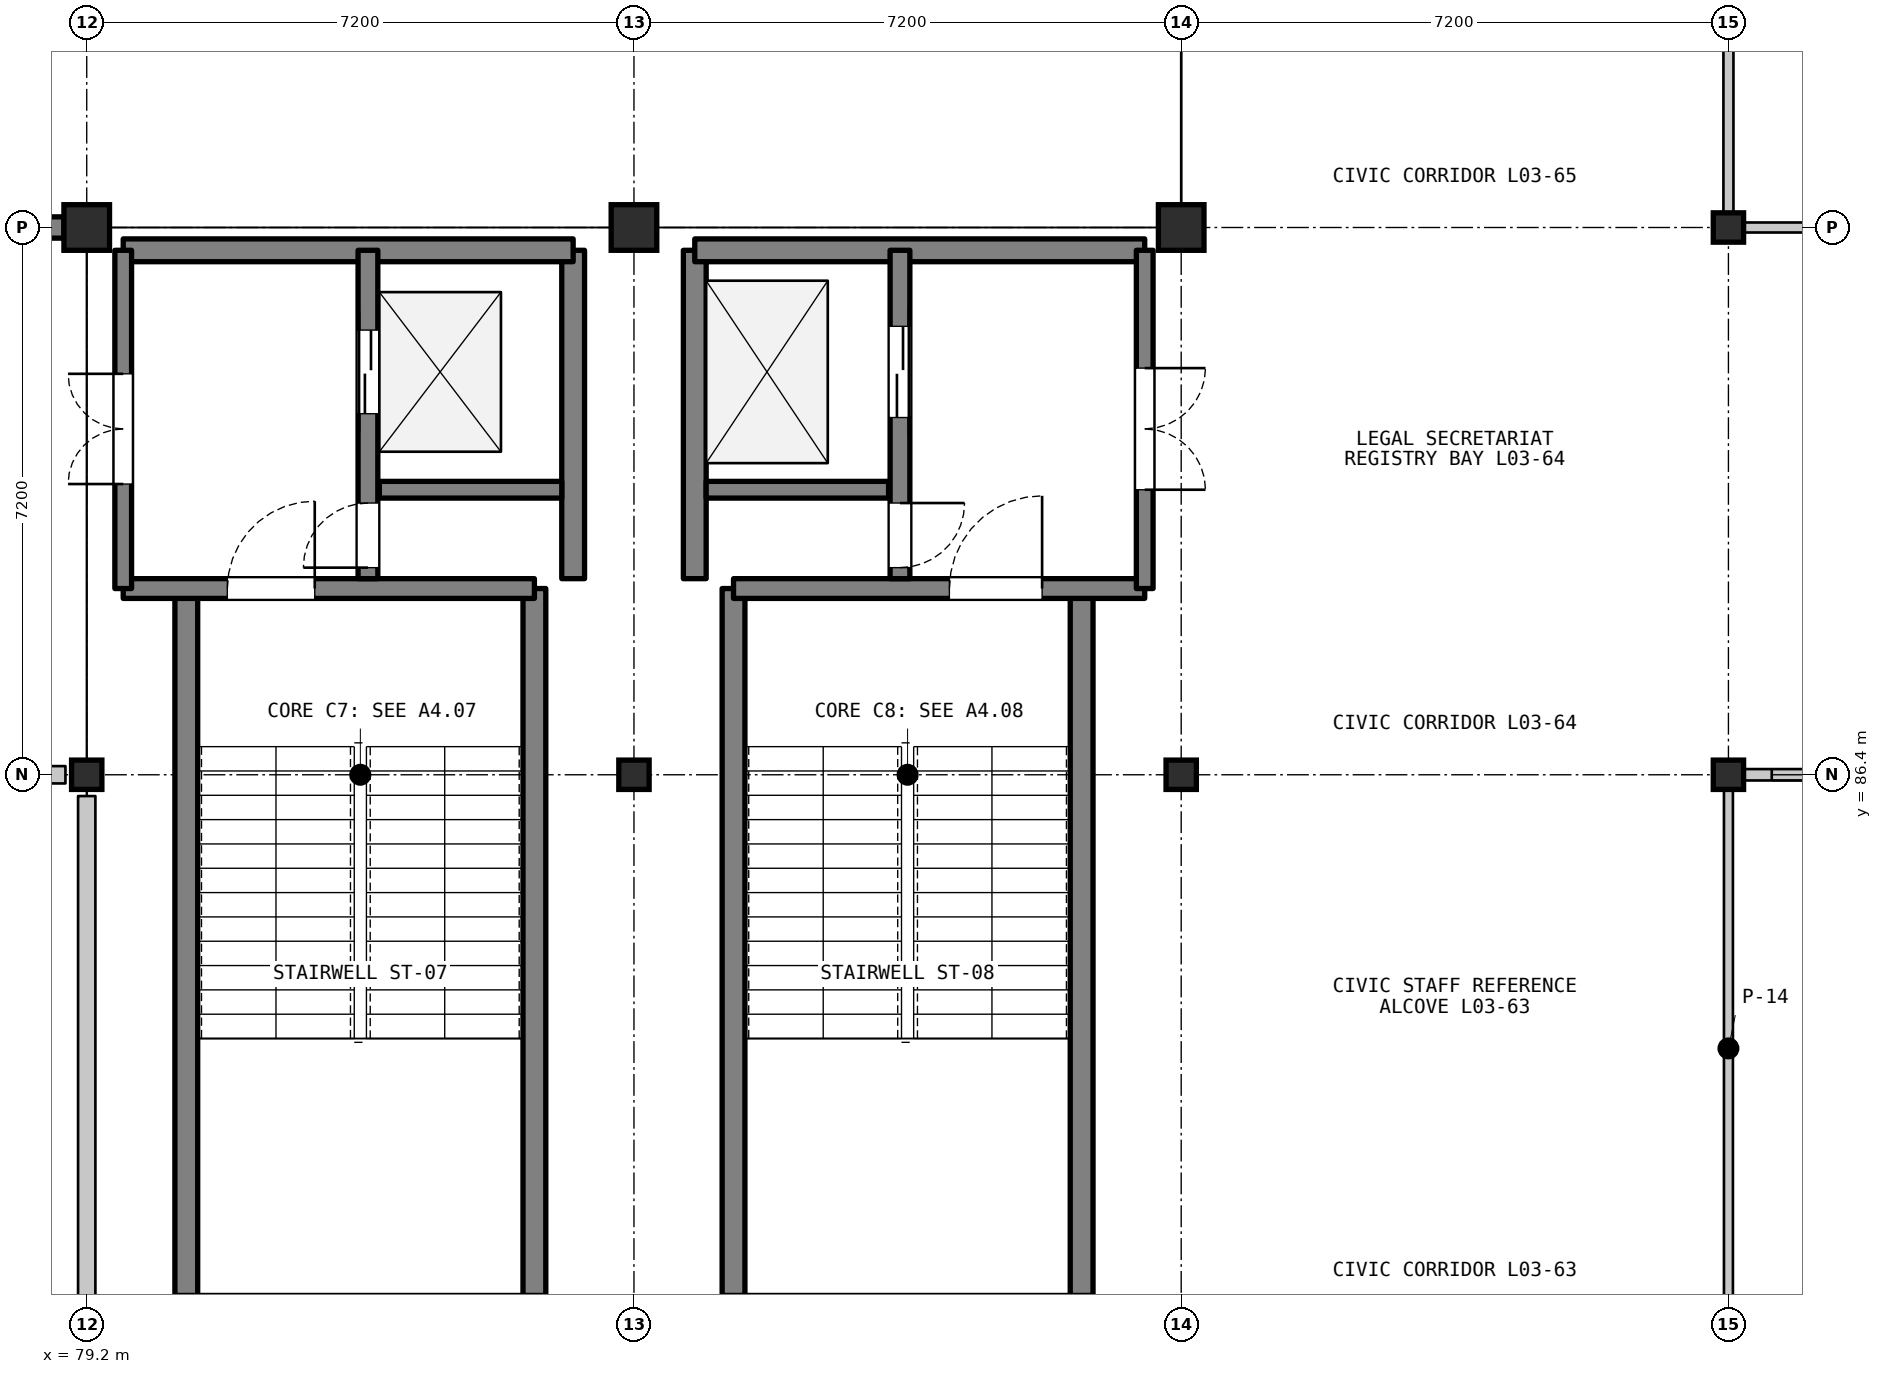
"""IFC4 building model, lengths in metres.
Left out: names, types, materials, properties, quantities, classifications, styles, units other than length and angle.
Written with IfcOpenShell. Run it as: python <this file> out.ifc"""

import sys

from ifc_helpers import new_model, si_unit, direction, frame, frame_2d, origin, origin_2d, place, context, subcontext, project, spatial, rectangle, i_section, extrude, element, fill, save


model = new_model("IFC4")
c1 = context("Model", 3, precision=1e-05, world=origin(), true_north=direction((0.0, 1.0)))
c2 = subcontext(c1, "Body", "Model", "MODEL_VIEW")
j1 = project(units=[si_unit("LENGTHUNIT", "METRE"), si_unit("PLANEANGLEUNIT", "RADIAN")], contexts=[c1])
p1 = place(None, origin())
s1 = spatial("IfcSite", under=j1, at=p1, CompositionType="ELEMENT")
p2 = place(p1, origin())
s2 = spatial("IfcBuilding", under=s1, at=p2, CompositionType="ELEMENT")
p3 = place(p2, frame((0.0, 0.0, 9.9)))
s3 = spatial("IfcBuildingStorey", under=s2, at=p3, CompositionType="ELEMENT", Elevation=9.9)
p4 = place(p3, frame((79.2, 86.4, 0.0), z_axis=(0.0, 0.0, 1.0), x_axis=(1.0, 0.0, 0.0)))
e1 = element("IfcColumn", 1, at=p4, inside=s3, PredefinedType="COLUMN", context=c2, shape_type="SweptSolid", body=[
    extrude(i_section(OverallWidth=0.399, OverallDepth=0.386, WebThickness=0.021, FlangeThickness=0.033, FilletRadius=0.015, at=origin_2d()), origin(), (0.0, 0.0, 1.0), 4.2),
])
p5 = place(p3, frame((79.2, 93.6, 0.0), z_axis=(0.0, 0.0, 1.0), x_axis=(1.0, 0.0, 0.0)))
e2 = element("IfcColumn", 2, at=p5, inside=s3, PredefinedType="COLUMN", context=c2, shape_type="SweptSolid", body=[
    extrude(rectangle(XDim=0.6, YDim=0.6, at=origin_2d()), origin(), (0.0, 0.0, 1.0), 4.2),
])
p6 = place(p3, frame((86.4, 86.4, 0.0), z_axis=(0.0, 0.0, 1.0), x_axis=(1.0, 0.0, 0.0)))
e3 = element("IfcColumn", 3, at=p6, inside=s3, PredefinedType="COLUMN", context=c2, shape_type="SweptSolid", body=[
    extrude(i_section(OverallWidth=0.399, OverallDepth=0.386, WebThickness=0.021, FlangeThickness=0.033, FilletRadius=0.015, at=origin_2d()), origin(), (0.0, 0.0, 1.0), 4.2),
])
p7 = place(p3, frame((86.4, 93.6, 0.0), z_axis=(0.0, 0.0, 1.0), x_axis=(1.0, 0.0, 0.0)))
e4 = element("IfcColumn", 4, at=p7, inside=s3, PredefinedType="COLUMN", context=c2, shape_type="SweptSolid", body=[
    extrude(rectangle(XDim=0.6, YDim=0.6, at=origin_2d()), origin(), (0.0, 0.0, 1.0), 4.2),
])
p8 = place(p3, frame((93.6, 86.4, 0.0), z_axis=(0.0, 0.0, 1.0), x_axis=(1.0, 0.0, 0.0)))
e5 = element("IfcColumn", 5, at=p8, inside=s3, PredefinedType="COLUMN", context=c2, shape_type="SweptSolid", body=[
    extrude(i_section(OverallWidth=0.399, OverallDepth=0.386, WebThickness=0.021, FlangeThickness=0.033, FilletRadius=0.015, at=origin_2d()), origin(), (0.0, 0.0, 1.0), 4.2),
])
p9 = place(p3, frame((93.6, 93.6, 0.0), z_axis=(0.0, 0.0, 1.0), x_axis=(1.0, 0.0, 0.0)))
e6 = element("IfcColumn", 6, at=p9, inside=s3, PredefinedType="COLUMN", context=c2, shape_type="SweptSolid", body=[
    extrude(rectangle(XDim=0.6, YDim=0.6, at=origin_2d()), origin(), (0.0, 0.0, 1.0), 4.2),
])
for number, where, z_axis, x_axis in (
    (7, (100.8, 86.4, 0.0), (0.0, 0.0, 1.0), (1.0, 0.0, 0.0)),
    (8, (100.8, 93.6, 0.0), (0.0, 0.0, 1.0), (1.0, 0.0, 0.0)),
):
    element("IfcColumn", number, at=place(p3, frame(where, z_axis=z_axis, x_axis=x_axis)), inside=s3, PredefinedType="COLUMN", context=c2, shape_type="SweptSolid", body=[
        extrude(i_section(OverallWidth=0.399, OverallDepth=0.386, WebThickness=0.021, FlangeThickness=0.033, FilletRadius=0.015, at=origin_2d()), origin(), (0.0, 0.0, 1.0), 4.2),
    ])
p10 = place(p3, frame((72.3, 93.6, 0.0), z_axis=(0.0, 0.0, 1.0), x_axis=(1.0, 0.0, 0.0)))
e9 = element("IfcWall", 9, at=p10, inside=s3, PredefinedType="SOLIDWALL", context=c2, shape_type="SweptSolid", body=[
    extrude(rectangle(XDim=6.6, YDim=0.28, at=frame_2d((3.3, 0.0))), origin(), (0.0, 0.0, 1.0), 3.418),
])
for number, where, z_axis, x_axis in (
    (10, (80.51, 79.55, 0.0), (0.0, 0.0, 1.0), (0.0, 1.0, 0.0)),
    (11, (85.09, 79.55, 0.0), (0.0, 0.0, 1.0), (0.0, 1.0, 0.0)),
):
    element("IfcWall", number, at=place(p3, frame(where, z_axis=z_axis, x_axis=x_axis)), inside=s3, PredefinedType="SHEAR", context=c2, shape_type="SweptSolid", body=[
        extrude(rectangle(XDim=9.3, YDim=0.3, at=frame_2d((4.65, 0.0))), origin(), (0.0, 0.0, 1.0), 4.02),
    ])
p11 = place(p3, frame((79.68, 88.85, 0.0), z_axis=(0.0, 0.0, 1.0), x_axis=(1.0, 0.0, 0.0)))
e12 = element("IfcWall", 12, at=p11, inside=s3, PredefinedType="SHEAR", context=c2, shape_type="SweptSolid", body=[
    extrude(rectangle(XDim=5.41, YDim=0.26, at=frame_2d((2.705, 0.0))), origin(), (0.0, 0.0, 1.0), 4.02),
])
p12 = place(p11, frame((1.37, 0.0, 0.0)))
e13 = element("IfcOpeningElement", 13, at=p12, cuts=e12, PredefinedType="OPENING", context=c2, shape_type="SweptSolid", body=[
    extrude(rectangle(XDim=1.15, YDim=2.15, at=frame_2d((0.575, 1.075))), frame((0.0, 0.14, 0.0), z_axis=(0.0, -1.0, 0.0), x_axis=(1.0, 0.0, 0.0)), (0.0, 0.0, 1.0), 0.28),
])
p13 = place(p3, frame((85.6, 88.98, 0.0), z_axis=(0.0, 0.0, 1.0), x_axis=(0.0, 1.0, 0.0)))
e14 = element("IfcWall", 14, at=p13, inside=s3, PredefinedType="SHEAR", context=c2, shape_type="SweptSolid", body=[
    extrude(rectangle(XDim=4.32, YDim=0.3, at=frame_2d((2.16, 0.0))), origin(), (0.0, 0.0, 1.0), 4.02),
])
p14 = place(p3, frame((79.68, 93.3, 0.0), z_axis=(0.0, 0.0, 1.0), x_axis=(1.0, 0.0, 0.0)))
e15 = element("IfcWall", 15, at=p14, inside=s3, PredefinedType="SHEAR", context=c2, shape_type="SweptSolid", body=[
    extrude(rectangle(XDim=5.92, YDim=0.3, at=frame_2d((2.96, 0.0))), origin(), (0.0, 0.0, 1.0), 4.02),
])
p15 = place(p3, frame((83.05, 90.15, 0.0), z_axis=(0.0, 0.0, 1.0), x_axis=(1.0, 0.0, 0.0)))
e16 = element("IfcWall", 16, at=p15, inside=s3, PredefinedType="SHEAR", context=c2, shape_type="SweptSolid", body=[
    extrude(rectangle(XDim=2.4, YDim=0.22, at=frame_2d((1.2, 0.0))), origin(), (0.0, 0.0, 1.0), 4.02),
])
p16 = place(p3, frame((82.9, 88.98, 0.0), z_axis=(0.0, 0.0, 1.0), x_axis=(0.0, 1.0, 0.0)))
e17 = element("IfcWall", 17, at=p16, inside=s3, PredefinedType="SHEAR", context=c2, shape_type="SweptSolid", body=[
    extrude(rectangle(XDim=4.32, YDim=0.26, at=frame_2d((2.16, 0.0))), origin(), (0.0, 0.0, 1.0), 4.02),
])
p17 = place(p16, frame((2.17, 0.0, 0.0)))
e18 = element("IfcOpeningElement", 18, at=p17, cuts=e17, PredefinedType="OPENING", context=c2, shape_type="SweptSolid", body=[
    extrude(rectangle(XDim=1.1, YDim=2.15, at=frame_2d((0.55, 1.075))), frame((0.0, 0.14, 0.0), z_axis=(0.0, -1.0, 0.0), x_axis=(1.0, 0.0, 0.0)), (0.0, 0.0, 1.0), 0.28),
])
p18 = place(p16, frame((0.145, 0.0, 0.0)))
e19 = element("IfcOpeningElement", 19, at=p18, cuts=e17, PredefinedType="OPENING", context=c2, shape_type="SweptSolid", body=[
    extrude(rectangle(XDim=0.85, YDim=2.05, at=frame_2d((0.425, 1.025))), frame((0.0, 0.14, 0.0), z_axis=(0.0, -1.0, 0.0), x_axis=(1.0, 0.0, 0.0)), (0.0, 0.0, 1.0), 0.28),
])
p19 = place(p3, frame((79.68, 88.85, 0.0), z_axis=(0.0, 0.0, 1.0), x_axis=(0.0, 1.0, 0.0)))
e20 = element("IfcWall", 20, at=p19, inside=s3, PredefinedType="SHEAR", context=c2, shape_type="SweptSolid", body=[
    extrude(rectangle(XDim=4.45, YDim=0.22, at=frame_2d((2.225, 0.0))), origin(), (0.0, 0.0, 1.0), 4.02),
])
p20 = place(p19, frame((1.375, 0.0, 0.0)))
e21 = element("IfcOpeningElement", 21, at=p20, cuts=e20, PredefinedType="OPENING", context=c2, shape_type="SweptSolid", body=[
    extrude(rectangle(XDim=1.45, YDim=2.2, at=frame_2d((0.725, 1.1))), frame((0.0, 0.12, 0.0), z_axis=(0.0, -1.0, 0.0), x_axis=(1.0, 0.0, 0.0)), (0.0, 0.0, 1.0), 0.24),
])
for number, where, z_axis, x_axis in (
    (22, (87.71, 79.55, 0.0), (0.0, 0.0, 1.0), (0.0, 1.0, 0.0)),
    (23, (92.29, 79.55, 0.0), (0.0, 0.0, 1.0), (0.0, 1.0, 0.0)),
):
    element("IfcWall", number, at=place(p3, frame(where, z_axis=z_axis, x_axis=x_axis)), inside=s3, PredefinedType="SHEAR", context=c2, shape_type="SweptSolid", body=[
        extrude(rectangle(XDim=9.3, YDim=0.3, at=frame_2d((4.65, 0.0))), origin(), (0.0, 0.0, 1.0), 4.02),
    ])
p21 = place(p3, frame((87.71, 88.85, 0.0), z_axis=(0.0, 0.0, 1.0), x_axis=(1.0, 0.0, 0.0)))
e24 = element("IfcWall", 24, at=p21, inside=s3, PredefinedType="SHEAR", context=c2, shape_type="SweptSolid", body=[
    extrude(rectangle(XDim=5.41, YDim=0.26, at=frame_2d((2.705, 0.0))), origin(), (0.0, 0.0, 1.0), 4.02),
])
p22 = place(p21, frame((2.84, 0.0, 0.0)))
e25 = element("IfcOpeningElement", 25, at=p22, cuts=e24, PredefinedType="OPENING", context=c2, shape_type="SweptSolid", body=[
    extrude(rectangle(XDim=1.22, YDim=2.15, at=frame_2d((0.61, 1.075))), frame((0.0, 0.14, 0.0), z_axis=(0.0, -1.0, 0.0), x_axis=(1.0, 0.0, 0.0)), (0.0, 0.0, 1.0), 0.28),
])
p23 = place(p3, frame((87.2, 88.98, 0.0), z_axis=(0.0, 0.0, 1.0), x_axis=(0.0, 1.0, 0.0)))
e26 = element("IfcWall", 26, at=p23, inside=s3, PredefinedType="SHEAR", context=c2, shape_type="SweptSolid", body=[
    extrude(rectangle(XDim=4.32, YDim=0.3, at=frame_2d((2.16, 0.0))), origin(), (0.0, 0.0, 1.0), 4.02),
])
p24 = place(p3, frame((87.2, 93.3, 0.0), z_axis=(0.0, 0.0, 1.0), x_axis=(1.0, 0.0, 0.0)))
e27 = element("IfcWall", 27, at=p24, inside=s3, PredefinedType="SHEAR", context=c2, shape_type="SweptSolid", body=[
    extrude(rectangle(XDim=5.92, YDim=0.3, at=frame_2d((2.96, 0.0))), origin(), (0.0, 0.0, 1.0), 4.02),
])
p25 = place(p3, frame((87.35, 90.15, 0.0), z_axis=(0.0, 0.0, 1.0), x_axis=(1.0, 0.0, 0.0)))
e28 = element("IfcWall", 28, at=p25, inside=s3, PredefinedType="SHEAR", context=c2, shape_type="SweptSolid", body=[
    extrude(rectangle(XDim=2.4, YDim=0.22, at=frame_2d((1.2, 0.0))), origin(), (0.0, 0.0, 1.0), 4.02),
])
p26 = place(p3, frame((89.9, 93.3, 0.0), z_axis=(0.0, 0.0, 1.0), x_axis=(0.0, -1.0, 0.0)))
e29 = element("IfcWall", 29, at=p26, inside=s3, PredefinedType="SHEAR", context=c2, shape_type="SweptSolid", body=[
    extrude(rectangle(XDim=4.32, YDim=0.26, at=frame_2d((2.16, 0.0))), origin(), (0.0, 0.0, 1.0), 4.02),
])
p27 = place(p26, frame((1.0, 0.0, 0.0)))
e30 = element("IfcOpeningElement", 30, at=p27, cuts=e29, PredefinedType="OPENING", context=c2, shape_type="SweptSolid", body=[
    extrude(rectangle(XDim=1.2, YDim=2.15, at=frame_2d((0.6, 1.075))), frame((0.0, 0.14, 0.0), z_axis=(0.0, -1.0, 0.0), x_axis=(1.0, 0.0, 0.0)), (0.0, 0.0, 1.0), 0.28),
])
p28 = place(p26, frame((3.325, 0.0, 0.0)))
e31 = element("IfcOpeningElement", 31, at=p28, cuts=e29, PredefinedType="OPENING", context=c2, shape_type="SweptSolid", body=[
    extrude(rectangle(XDim=0.85, YDim=2.05, at=frame_2d((0.425, 1.025))), frame((0.0, 0.14, 0.0), z_axis=(0.0, -1.0, 0.0), x_axis=(1.0, 0.0, 0.0)), (0.0, 0.0, 1.0), 0.28),
])
p29 = place(p3, frame((93.12, 93.3, 0.0), z_axis=(0.0, 0.0, 1.0), x_axis=(0.0, -1.0, 0.0)))
e32 = element("IfcWall", 32, at=p29, inside=s3, PredefinedType="SHEAR", context=c2, shape_type="SweptSolid", body=[
    extrude(rectangle(XDim=4.45, YDim=0.22, at=frame_2d((2.225, 0.0))), origin(), (0.0, 0.0, 1.0), 4.02),
])
p30 = place(p29, frame((1.55, 0.0, 0.0)))
e33 = element("IfcOpeningElement", 33, at=p30, cuts=e32, PredefinedType="OPENING", context=c2, shape_type="SweptSolid", body=[
    extrude(rectangle(XDim=1.6, YDim=2.2, at=frame_2d((0.8, 1.1))), frame((0.0, 0.12, 0.0), z_axis=(0.0, -1.0, 0.0), x_axis=(1.0, 0.0, 0.0)), (0.0, 0.0, 1.0), 0.24),
])
p31 = place(p3, frame((72.12, 86.4, 0.0), z_axis=(0.0, 0.0, 1.0), x_axis=(1.0, 0.0, 0.0)))
e34 = element("IfcWall", 34, at=p31, inside=s3, PredefinedType="PARTITIONING", context=c2, shape_type="SweptSolid", body=[
    extrude(rectangle(XDim=6.8, YDim=0.228, at=frame_2d((3.4, 0.0))), origin(), (0.0, 0.0, 1.0), 3.408),
])
p32 = place(p31, frame((2.83, 0.0, 0.0)))
e35 = element("IfcOpeningElement", 35, at=p32, cuts=e34, PredefinedType="OPENING", context=c2, shape_type="SweptSolid", body=[
    extrude(rectangle(XDim=1.14, YDim=2.18, at=frame_2d((0.57, 1.09))), frame((0.0, 0.124, 0.0), z_axis=(0.0, -1.0, 0.0), x_axis=(1.0, 0.0, 0.0)), (0.0, 0.0, 1.0), 0.248),
])
p33 = place(p31, frame((0.45, 0.0, 1.05)))
e36 = element("IfcOpeningElement", 36, at=p33, cuts=e34, PredefinedType="OPENING", context=c2, shape_type="SweptSolid", body=[
    extrude(rectangle(XDim=2.05, YDim=1.22, at=frame_2d((1.025, 0.61))), frame((0.0, 0.124, 0.0), z_axis=(0.0, -1.0, 0.0), x_axis=(1.0, 0.0, 0.0)), (0.0, 0.0, 1.0), 0.248),
])
p34 = place(p3, frame((79.2, 86.12, 0.0), z_axis=(0.0, 0.0, 1.0), x_axis=(0.0, -1.0, 0.0)))
e37 = element("IfcWall", 37, at=p34, inside=s3, PredefinedType="PARTITIONING", context=c2, shape_type="SweptSolid", body=[
    extrude(rectangle(XDim=6.64, YDim=0.228, at=frame_2d((3.32, 0.0))), origin(), (0.0, 0.0, 1.0), 3.477),
])
p35 = place(p3, frame((100.92, 86.4, 0.0), z_axis=(0.0, 0.0, 1.0), x_axis=(1.0, 0.0, 0.0)))
e38 = element("IfcWall", 38, at=p35, inside=s3, PredefinedType="PARTITIONING", context=c2, shape_type="SweptSolid", body=[
    extrude(rectangle(XDim=6.96, YDim=0.15, at=frame_2d((3.48, 0.0))), origin(), (0.0, 0.0, 1.0), 3.408),
])
p36 = place(p35, frame((2.62, 0.0, 0.0)))
e39 = element("IfcOpeningElement", 39, at=p36, cuts=e38, PredefinedType="OPENING", context=c2, shape_type="SweptSolid", body=[
    extrude(rectangle(XDim=1.72, YDim=2.32, at=frame_2d((0.86, 1.16))), frame((0.0, 0.085, 0.0), z_axis=(0.0, -1.0, 0.0), x_axis=(1.0, 0.0, 0.0)), (0.0, 0.0, 1.0), 0.17),
])
p37 = place(p35, frame((0.45, 0.0, 1.05)))
e40 = element("IfcOpeningElement", 40, at=p37, cuts=e38, PredefinedType="OPENING", context=c2, shape_type="SweptSolid", body=[
    extrude(rectangle(XDim=1.62, YDim=0.96, at=frame_2d((0.81, 0.48))), frame((0.0, 0.085, 0.0), z_axis=(0.0, -1.0, 0.0), x_axis=(1.0, 0.0, 0.0)), (0.0, 0.0, 1.0), 0.17),
])
p38 = place(p3, frame((100.8, 79.32, 0.0), z_axis=(0.0, 0.0, 1.0), x_axis=(0.0, 1.0, 0.0)))
e41 = element("IfcWall", 41, at=p38, inside=s3, PredefinedType="PARTITIONING", context=c2, shape_type="SweptSolid", body=[
    extrude(rectangle(XDim=6.96, YDim=0.118, at=frame_2d((3.48, 0.0))), origin(), (0.0, 0.0, 1.0), 3.408),
])
p39 = place(p3, frame((107.88, 93.6, 0.0), z_axis=(0.0, 0.0, 1.0), x_axis=(-1.0, 0.0, 0.0)))
e42 = element("IfcWall", 42, at=p39, inside=s3, PredefinedType="PARTITIONING", context=c2, shape_type="SweptSolid", body=[
    extrude(rectangle(XDim=6.96, YDim=0.132, at=frame_2d((3.48, 0.0))), origin(), (0.0, 0.0, 1.0), 3.408),
])
p40 = place(p39, frame((2.59, 0.0, 0.0)))
e43 = element("IfcOpeningElement", 43, at=p40, cuts=e42, PredefinedType="OPENING", context=c2, shape_type="SweptSolid", body=[
    extrude(rectangle(XDim=1.78, YDim=2.36, at=frame_2d((0.89, 1.18))), frame((0.0, 0.076, 0.0), z_axis=(0.0, -1.0, 0.0), x_axis=(1.0, 0.0, 0.0)), (0.0, 0.0, 1.0), 0.152),
])
p41 = place(p39, frame((0.45, 0.0, 1.05)))
e44 = element("IfcOpeningElement", 44, at=p41, cuts=e42, PredefinedType="OPENING", context=c2, shape_type="SweptSolid", body=[
    extrude(rectangle(XDim=1.72, YDim=1.02, at=frame_2d((0.86, 0.51))), frame((0.0, 0.076, 0.0), z_axis=(0.0, -1.0, 0.0), x_axis=(1.0, 0.0, 0.0)), (0.0, 0.0, 1.0), 0.152),
])
p42 = place(p3, frame((100.8, 93.72, 0.0), z_axis=(0.0, 0.0, 1.0), x_axis=(0.0, 1.0, 0.0)))
e45 = element("IfcWall", 45, at=p42, inside=s3, PredefinedType="PARTITIONING", context=c2, shape_type="SweptSolid", body=[
    extrude(rectangle(XDim=6.96, YDim=0.132, at=frame_2d((3.48, 0.0))), origin(), (0.0, 0.0, 1.0), 3.408),
])
p43 = place(p12, origin())
e46 = element("IfcDoor", 46, at=p43, inside=s3, OperationType="SINGLE_SWING_RIGHT", PredefinedType="DOOR", context=c2, shape_type="SweptSolid", body=[
    extrude(rectangle(XDim=1.15, YDim=2.15, at=frame_2d((0.575, 1.075))), frame((0.0, 0.025, 0.0), z_axis=(0.0, -1.0, 0.0), x_axis=(1.0, 0.0, 0.0)), (0.0, 0.0, 1.0), 0.05),
])
fill(e13, e46)
p44 = place(p17, origin())
e47 = element("IfcDoor", 47, at=p44, inside=s3, OperationType="DOUBLE_DOOR_SLIDING", PredefinedType="DOOR", context=c2, shape_type="SweptSolid", body=[
    extrude(rectangle(XDim=1.1, YDim=2.15, at=frame_2d((0.55, 1.075))), frame((0.0, 0.025, 0.0), z_axis=(0.0, -1.0, 0.0), x_axis=(1.0, 0.0, 0.0)), (0.0, 0.0, 1.0), 0.05),
])
fill(e18, e47)
p45 = place(p18, origin())
e48 = element("IfcDoor", 48, at=p45, inside=s3, OperationType="SINGLE_SWING_LEFT", PredefinedType="DOOR", context=c2, shape_type="SweptSolid", body=[
    extrude(rectangle(XDim=0.85, YDim=2.05, at=frame_2d((0.425, 1.025))), frame((0.0, 0.025, 0.0), z_axis=(0.0, -1.0, 0.0), x_axis=(1.0, 0.0, 0.0)), (0.0, 0.0, 1.0), 0.05),
])
fill(e19, e48)
p46 = place(p20, origin())
e49 = element("IfcDoor", 49, at=p46, inside=s3, OperationType="DOUBLE_DOOR_SINGLE_SWING", PredefinedType="DOOR", context=c2, shape_type="SweptSolid", body=[
    extrude(rectangle(XDim=1.45, YDim=2.2, at=frame_2d((0.725, 1.1))), frame((0.0, 0.025, 0.0), z_axis=(0.0, -1.0, 0.0), x_axis=(1.0, 0.0, 0.0)), (0.0, 0.0, 1.0), 0.05),
])
fill(e21, e49)
p47 = place(p22, origin())
e50 = element("IfcDoor", 50, at=p47, inside=s3, OperationType="SINGLE_SWING_RIGHT", PredefinedType="DOOR", context=c2, shape_type="SweptSolid", body=[
    extrude(rectangle(XDim=1.22, YDim=2.15, at=frame_2d((0.61, 1.075))), frame((0.0, 0.025, 0.0), z_axis=(0.0, -1.0, 0.0), x_axis=(1.0, 0.0, 0.0)), (0.0, 0.0, 1.0), 0.05),
])
fill(e25, e50)
p48 = place(p27, origin())
e51 = element("IfcDoor", 51, at=p48, inside=s3, OperationType="DOUBLE_DOOR_SLIDING", PredefinedType="DOOR", context=c2, shape_type="SweptSolid", body=[
    extrude(rectangle(XDim=1.2, YDim=2.15, at=frame_2d((0.6, 1.075))), frame((0.0, 0.025, 0.0), z_axis=(0.0, -1.0, 0.0), x_axis=(1.0, 0.0, 0.0)), (0.0, 0.0, 1.0), 0.05),
])
fill(e30, e51)
p49 = place(p28, origin())
e52 = element("IfcDoor", 52, at=p49, inside=s3, OperationType="SINGLE_SWING_LEFT", PredefinedType="DOOR", context=c2, shape_type="SweptSolid", body=[
    extrude(rectangle(XDim=0.85, YDim=2.05, at=frame_2d((0.425, 1.025))), frame((0.0, 0.025, 0.0), z_axis=(0.0, -1.0, 0.0), x_axis=(1.0, 0.0, 0.0)), (0.0, 0.0, 1.0), 0.05),
])
fill(e31, e52)
p50 = place(p30, origin())
e53 = element("IfcDoor", 53, at=p50, inside=s3, OperationType="DOUBLE_DOOR_SINGLE_SWING", PredefinedType="DOOR", context=c2, shape_type="SweptSolid", body=[
    extrude(rectangle(XDim=1.6, YDim=2.2, at=frame_2d((0.8, 1.1))), frame((0.0, 0.025, 0.0), z_axis=(0.0, -1.0, 0.0), x_axis=(1.0, 0.0, 0.0)), (0.0, 0.0, 1.0), 0.05),
])
fill(e33, e53)
p51 = place(p37, origin())
e54 = element("IfcWindow", 54, at=p51, inside=s3, PartitioningType="SINGLE_PANEL", PredefinedType="WINDOW", context=c2, shape_type="SweptSolid", body=[
    extrude(rectangle(XDim=1.62, YDim=0.96, at=frame_2d((0.81, 0.48))), frame((0.0, 0.03, 0.0), z_axis=(0.0, -1.0, 0.0), x_axis=(1.0, 0.0, 0.0)), (0.0, 0.0, 1.0), 0.06),
])
fill(e40, e54)
save(model, sys.argv[1])
